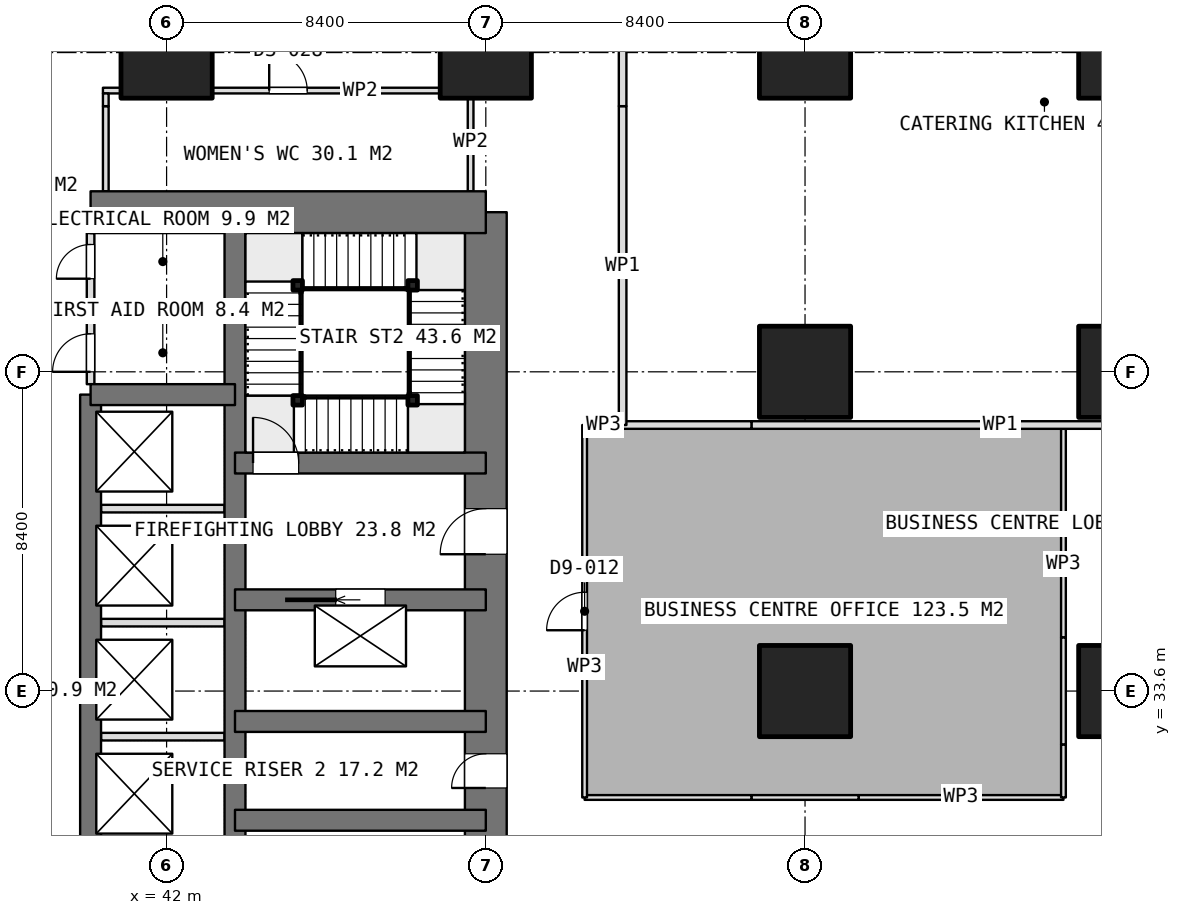
"""IFC4 building model, lengths in metres.
Left out: names, types, materials, properties, quantities, classifications, styles, units other than length and angle.
Written with IfcOpenShell. Run it as: python <this file> out.ifc"""

import sys

from ifc_helpers import new_model, si_unit, direction, frame, frame_2d, origin, origin_2d, place, context, subcontext, project, spatial, rectangle, extrude, element, fill, save


model = new_model("IFC4")
c1 = context("Model", 3, precision=1e-05, world=origin(), true_north=direction((0.0, 1.0)))
c2 = subcontext(c1, "Body", "Model", "MODEL_VIEW")
j1 = project(units=[si_unit("LENGTHUNIT", "METRE"), si_unit("PLANEANGLEUNIT", "RADIAN")], contexts=[c1])
p1 = place(None, origin())
s1 = spatial("IfcSite", under=j1, at=p1, CompositionType="ELEMENT")
p2 = place(p1, origin())
s2 = spatial("IfcBuilding", under=s1, at=p2, CompositionType="ELEMENT")
p3 = place(p2, frame((0.0, 0.0, 20.4)))
s3 = spatial("IfcBuildingStorey", under=s2, at=p3, CompositionType="ELEMENT", Elevation=20.4)
p4 = place(p3, frame((40.0, 46.2, 0.0), z_axis=(0.0, 0.0, 1.0), x_axis=(1.0, 0.0, 0.0)))
e1 = element("IfcWall", 1, at=p4, inside=s3, PredefinedType="SHEAR", context=c2, shape_type="SweptSolid", body=[
    extrude(rectangle(XDim=10.4, YDim=1.1, at=frame_2d((5.2, 0.0))), origin(), (0.0, 0.0, 1.0), 5.0),
])
p5 = place(p3, frame((50.4, 21.0, 0.0), z_axis=(0.0, 0.0, 1.0), x_axis=(0.0, 1.0, 0.0)))
e2 = element("IfcWall", 2, at=p5, inside=s3, PredefinedType="SHEAR", context=c2, shape_type="SweptSolid", body=[
    extrude(rectangle(XDim=25.2, YDim=1.1, at=frame_2d((12.6, 0.0))), origin(), (0.0, 0.0, 1.0), 5.0),
])
p6 = place(p5, frame((16.2, 0.0, 0.0)))
e3 = element("IfcOpeningElement", 3, at=p6, cuts=e2, PredefinedType="OPENING", context=c2, shape_type="SweptSolid", body=[
    extrude(rectangle(XDim=1.2, YDim=2.1, at=frame_2d((0.6, 1.05))), frame((0.0, 0.56, 0.0), z_axis=(0.0, -1.0, 0.0), x_axis=(1.0, 0.0, 0.0)), (0.0, 0.0, 1.0), 1.12),
])
p7 = place(p5, frame((10.05, 0.0, 0.0)))
e4 = element("IfcOpeningElement", 4, at=p7, cuts=e2, PredefinedType="OPENING", context=c2, shape_type="SweptSolid", body=[
    extrude(rectangle(XDim=0.9, YDim=2.1, at=frame_2d((0.45, 1.05))), frame((0.0, 0.56, 0.0), z_axis=(0.0, -1.0, 0.0), x_axis=(1.0, 0.0, 0.0)), (0.0, 0.0, 1.0), 1.12),
])
p8 = place(p5, frame((7.45, 0.0, 0.0)))
e5 = element("IfcOpeningElement", 5, at=p8, cuts=e2, PredefinedType="OPENING", context=c2, shape_type="SweptSolid", body=[
    extrude(rectangle(XDim=0.9, YDim=2.1, at=frame_2d((0.45, 1.05))), frame((0.0, 0.56, 0.0), z_axis=(0.0, -1.0, 0.0), x_axis=(1.0, 0.0, 0.0)), (0.0, 0.0, 1.0), 1.12),
])
p9 = place(p5, frame((0.75, 0.0, 0.0)))
e6 = element("IfcOpeningElement", 6, at=p9, cuts=e2, PredefinedType="OPENING", context=c2, shape_type="SweptSolid", body=[
    extrude(rectangle(XDim=1.2, YDim=2.1, at=frame_2d((0.6, 1.05))), frame((0.0, 0.56, 0.0), z_axis=(0.0, -1.0, 0.0), x_axis=(1.0, 0.0, 0.0)), (0.0, 0.0, 1.0), 1.12),
])
p10 = place(p3, frame((43.8, 21.0, 0.0), z_axis=(0.0, 0.0, 1.0), x_axis=(0.0, 1.0, 0.0)))
e7 = element("IfcWall", 7, at=p10, inside=s3, PredefinedType="SHEAR", context=c2, shape_type="SweptSolid", body=[
    extrude(rectangle(XDim=25.2, YDim=0.55, at=frame_2d((12.6, 0.0))), origin(), (0.0, 0.0, 1.0), 5.0),
])
p11 = place(p3, frame((40.0, 23.4, 0.0), z_axis=(0.0, 0.0, 1.0), x_axis=(0.0, 1.0, 0.0)))
e8 = element("IfcWall", 8, at=p11, inside=s3, PredefinedType="SHEAR", context=c2, shape_type="SweptSolid", body=[
    extrude(rectangle(XDim=18.0, YDim=0.55, at=frame_2d((9.0, 0.0))), origin(), (0.0, 0.0, 1.0), 5.0),
])
p12 = place(p3, frame((40.0, 41.4, 0.0), z_axis=(0.0, 0.0, 1.0), x_axis=(1.0, 0.0, 0.0)))
e9 = element("IfcWall", 9, at=p12, inside=s3, PredefinedType="SHEAR", context=c2, shape_type="SweptSolid", body=[
    extrude(rectangle(XDim=3.8, YDim=0.55, at=frame_2d((1.9, 0.0))), origin(), (0.0, 0.0, 1.0), 5.0),
])
for number, where, z_axis, x_axis in (
    (10, (43.8, 30.2, 0.0), (0.0, 0.0, 1.0), (1.0, 0.0, 0.0)),
    (11, (43.8, 32.8, 0.0), (0.0, 0.0, 1.0), (1.0, 0.0, 0.0)),
):
    element("IfcWall", number, at=place(p3, frame(where, z_axis=z_axis, x_axis=x_axis)), inside=s3, PredefinedType="SHEAR", context=c2, shape_type="SweptSolid", body=[
        extrude(rectangle(XDim=6.6, YDim=0.55, at=frame_2d((3.3, 0.0))), origin(), (0.0, 0.0, 1.0), 5.0),
    ])
p13 = place(p3, frame((43.8, 36.0, 0.0), z_axis=(0.0, 0.0, 1.0), x_axis=(1.0, 0.0, 0.0)))
e12 = element("IfcWall", 12, at=p13, inside=s3, PredefinedType="SHEAR", context=c2, shape_type="SweptSolid", body=[
    extrude(rectangle(XDim=6.6, YDim=0.55, at=frame_2d((3.3, 0.0))), origin(), (0.0, 0.0, 1.0), 5.0),
])
p14 = place(p13, frame((2.65, 0.0, 0.0)))
e13 = element("IfcOpeningElement", 13, at=p14, cuts=e12, PredefinedType="OPENING", context=c2, shape_type="SweptSolid", body=[
    extrude(rectangle(XDim=1.3, YDim=2.1, at=frame_2d((0.65, 1.05))), frame((0.0, 0.285, 0.0), z_axis=(0.0, -1.0, 0.0), x_axis=(1.0, 0.0, 0.0)), (0.0, 0.0, 1.0), 0.57),
])
p15 = place(p3, frame((43.8, 39.6, 0.0), z_axis=(0.0, 0.0, 1.0), x_axis=(1.0, 0.0, 0.0)))
e14 = element("IfcWall", 14, at=p15, inside=s3, PredefinedType="SHEAR", context=c2, shape_type="SweptSolid", body=[
    extrude(rectangle(XDim=6.6, YDim=0.55, at=frame_2d((3.3, 0.0))), origin(), (0.0, 0.0, 1.0), 5.0),
])
p16 = place(p15, frame((0.475, 0.0, 0.0)))
e15 = element("IfcOpeningElement", 15, at=p16, cuts=e14, PredefinedType="OPENING", context=c2, shape_type="SweptSolid", body=[
    extrude(rectangle(XDim=1.2, YDim=2.1, at=frame_2d((0.6, 1.05))), frame((0.0, 0.285, 0.0), z_axis=(0.0, -1.0, 0.0), x_axis=(1.0, 0.0, 0.0)), (0.0, 0.0, 1.0), 0.57),
])
for number, where, z_axis, x_axis in (
    (16, (42.0, 50.4, 0.0), (0.0, 0.0, 1.0), (1.0, 0.0, 0.0)),
    (17, (50.4, 50.4, 0.0), (0.0, 0.0, 1.0), (1.0, 0.0, 0.0)),
    (18, (58.8, 33.6, 0.0), (0.0, 0.0, 1.0), (1.0, 0.0, 0.0)),
    (19, (58.8, 42.0, 0.0), (0.0, 0.0, 1.0), (1.0, 0.0, 0.0)),
    (20, (58.8, 50.4, 0.0), (0.0, 0.0, 1.0), (1.0, 0.0, 0.0)),
    (21, (67.2, 33.6, 0.0), (0.0, 0.0, 1.0), (1.0, 0.0, 0.0)),
    (22, (67.2, 42.0, 0.0), (0.0, 0.0, 1.0), (1.0, 0.0, 0.0)),
    (23, (67.2, 50.4, 0.0), (0.0, 0.0, 1.0), (1.0, 0.0, 0.0)),
):
    element("IfcColumn", number, at=place(p3, frame(where, z_axis=z_axis, x_axis=x_axis)), inside=s3, PredefinedType="COLUMN", context=c2, shape_type="SweptSolid", body=[
        extrude(rectangle(XDim=2.4, YDim=2.4, at=origin_2d()), origin(), (0.0, 0.0, 1.0), 5.0),
    ])
for number, where, z_axis, x_axis in (
    (24, (40.275, 32.4, 0.0), (0.0, 0.0, 1.0), (1.0, 0.0, 0.0)),
    (25, (40.275, 35.4, 0.0), (0.0, 0.0, 1.0), (1.0, 0.0, 0.0)),
    (26, (40.275, 38.4, 0.0), (0.0, 0.0, 1.0), (1.0, 0.0, 0.0)),
):
    element("IfcWall", number, at=place(p3, frame(where, z_axis=z_axis, x_axis=x_axis)), inside=s3, PredefinedType="PARTITIONING", context=c2, shape_type="SweptSolid", body=[
        extrude(rectangle(XDim=3.25, YDim=0.2, at=frame_2d((1.625, 0.0))), origin(), (0.0, 0.0, 1.0), 4.6),
    ])
p17 = place(p3, frame((40.0, 41.675, 0.0), z_axis=(0.0, 0.0, 1.0), x_axis=(0.0, 1.0, 0.0)))
e27 = element("IfcWall", 27, at=p17, inside=s3, PredefinedType="PARTITIONING", context=c2, shape_type="SweptSolid", body=[
    extrude(rectangle(XDim=3.975, YDim=0.2, at=frame_2d((1.987, 0.0))), origin(), (0.0, 0.0, 1.0), 4.6),
])
p18 = place(p17, frame((2.775, 0.0, 0.0)))
e28 = element("IfcOpeningElement", 28, at=p18, cuts=e27, PredefinedType="OPENING", context=c2, shape_type="SweptSolid", body=[
    extrude(rectangle(XDim=0.9, YDim=2.1, at=frame_2d((0.45, 1.05))), frame((0.0, 0.11, 0.0), z_axis=(0.0, -1.0, 0.0), x_axis=(1.0, 0.0, 0.0)), (0.0, 0.0, 1.0), 0.22),
])
p19 = place(p17, frame((0.325, 0.0, 0.0)))
e29 = element("IfcOpeningElement", 29, at=p19, cuts=e27, PredefinedType="OPENING", context=c2, shape_type="SweptSolid", body=[
    extrude(rectangle(XDim=1.0, YDim=2.1, at=frame_2d((0.5, 1.05))), frame((0.0, 0.11, 0.0), z_axis=(0.0, -1.0, 0.0), x_axis=(1.0, 0.0, 0.0)), (0.0, 0.0, 1.0), 0.22),
])
p20 = place(p3, frame((40.0, 43.6, 0.0), z_axis=(0.0, 0.0, 1.0), x_axis=(1.0, 0.0, 0.0)))
e30 = element("IfcWall", 30, at=p20, inside=s3, PredefinedType="PARTITIONING", context=c2, shape_type="SweptSolid", body=[
    extrude(rectangle(XDim=3.525, YDim=0.2, at=frame_2d((1.762, 0.0))), origin(), (0.0, 0.0, 1.0), 4.6),
])
p21 = place(p3, frame((40.325, 49.4, 0.0), z_axis=(0.0, 0.0, 1.0), x_axis=(1.0, 0.0, 0.0)))
e31 = element("IfcWall", 31, at=p21, inside=s3, PredefinedType="PARTITIONING", context=c2, shape_type="SweptSolid", body=[
    extrude(rectangle(XDim=0.475, YDim=0.15, at=frame_2d((0.238, 0.0))), origin(), (0.0, 0.0, 1.0), 2.8),
])
p22 = place(p3, frame((40.8, 49.4, 0.0), z_axis=(0.0, 0.0, 1.0), x_axis=(1.0, 0.0, 0.0)))
e32 = element("IfcWall", 32, at=p22, inside=s3, PredefinedType="PARTITIONING", context=c2, shape_type="SweptSolid", body=[
    extrude(rectangle(XDim=2.4, YDim=0.15, at=frame_2d((1.2, 0.0))), origin(), (0.0, 0.0, 1.0), 4.6),
])
p23 = place(p3, frame((43.2, 49.4, 0.0), z_axis=(0.0, 0.0, 1.0), x_axis=(1.0, 0.0, 0.0)))
e33 = element("IfcWall", 33, at=p23, inside=s3, PredefinedType="PARTITIONING", context=c2, shape_type="SweptSolid", body=[
    extrude(rectangle(XDim=6.0, YDim=0.15, at=frame_2d((3.0, 0.0))), origin(), (0.0, 0.0, 1.0), 2.8),
])
p24 = place(p23, frame((1.5, 0.0, 0.0)))
e34 = element("IfcOpeningElement", 34, at=p24, cuts=e33, PredefinedType="OPENING", context=c2, shape_type="SweptSolid", body=[
    extrude(rectangle(XDim=1.0, YDim=2.1, at=frame_2d((0.5, 1.05))), frame((0.0, 0.085, 0.0), z_axis=(0.0, -1.0, 0.0), x_axis=(1.0, 0.0, 0.0)), (0.0, 0.0, 1.0), 0.17),
])
p25 = place(p3, frame((49.2, 49.4, 0.0), z_axis=(0.0, 0.0, 1.0), x_axis=(1.0, 0.0, 0.0)))
e35 = element("IfcWall", 35, at=p25, inside=s3, PredefinedType="PARTITIONING", context=c2, shape_type="SweptSolid", body=[
    extrude(rectangle(XDim=0.875, YDim=0.15, at=frame_2d((0.438, 0.0))), origin(), (0.0, 0.0, 1.0), 4.6),
])
p26 = place(p3, frame((40.4, 46.75, 0.0), z_axis=(0.0, 0.0, 1.0), x_axis=(0.0, 1.0, 0.0)))
e36 = element("IfcWall", 36, at=p26, inside=s3, PredefinedType="PARTITIONING", context=c2, shape_type="SweptSolid", body=[
    extrude(rectangle(XDim=2.24, YDim=0.15, at=frame_2d((1.12, 0.0))), origin(), (0.0, 0.0, 1.0), 4.6),
])
p27 = place(p3, frame((40.4, 48.99, 0.0), z_axis=(0.0, 0.0, 1.0), x_axis=(0.0, 1.0, 0.0)))
e37 = element("IfcWall", 37, at=p27, inside=s3, PredefinedType="PARTITIONING", context=c2, shape_type="SweptSolid", body=[
    extrude(rectangle(XDim=0.335, YDim=0.15, at=frame_2d((0.167, 0.0))), origin(), (0.0, 0.0, 1.0), 2.8),
])
p28 = place(p3, frame((50.0, 46.75, 0.0), z_axis=(0.0, 0.0, 1.0), x_axis=(0.0, 1.0, 0.0)))
e38 = element("IfcWall", 38, at=p28, inside=s3, PredefinedType="PARTITIONING", context=c2, shape_type="SweptSolid", body=[
    extrude(rectangle(XDim=2.575, YDim=0.15, at=frame_2d((1.288, 0.0))), origin(), (0.0, 0.0, 1.0), 4.6),
])
p29 = place(p3, frame((76.09, 40.6, 0.0), z_axis=(0.0, 0.0, 1.0), x_axis=(-1.0, 0.0, 0.0)))
e39 = element("IfcWall", 39, at=p29, inside=s3, PredefinedType="PARTITIONING", context=c2, shape_type="SweptSolid", body=[
    extrude(rectangle(XDim=18.7, YDim=0.2, at=frame_2d((9.35, 0.0))), origin(), (0.0, 0.0, 1.0), 2.8),
])
p30 = place(p29, frame((5.77, 0.0, 0.0)))
e40 = element("IfcOpeningElement", 40, at=p30, cuts=e39, PredefinedType="OPENING", context=c2, shape_type="SweptSolid", body=[
    extrude(rectangle(XDim=1.8, YDim=2.1, at=frame_2d((0.9, 1.05))), frame((0.0, 0.11, 0.0), z_axis=(0.0, -1.0, 0.0), x_axis=(1.0, 0.0, 0.0)), (0.0, 0.0, 1.0), 0.22),
])
p31 = place(p3, frame((57.39, 40.6, 0.0), z_axis=(0.0, 0.0, 1.0), x_axis=(-1.0, 0.0, 0.0)))
e41 = element("IfcWall", 41, at=p31, inside=s3, PredefinedType="PARTITIONING", context=c2, shape_type="SweptSolid", body=[
    extrude(rectangle(XDim=3.39, YDim=0.2, at=frame_2d((1.695, 0.0))), origin(), (0.0, 0.0, 1.0), 4.6),
])
p32 = place(p3, frame((54.0, 40.6, 0.0), z_axis=(0.0, 0.0, 1.0), x_axis=(0.0, 1.0, 0.0)))
e42 = element("IfcWall", 42, at=p32, inside=s3, PredefinedType="PARTITIONING", context=c2, shape_type="SweptSolid", body=[
    extrude(rectangle(XDim=8.39, YDim=0.2, at=frame_2d((4.195, 0.0))), origin(), (0.0, 0.0, 1.0), 4.6),
])
p33 = place(p3, frame((54.0, 48.99, 0.0), z_axis=(0.0, 0.0, 1.0), x_axis=(0.0, 1.0, 0.0)))
e43 = element("IfcWall", 43, at=p33, inside=s3, PredefinedType="PARTITIONING", context=c2, shape_type="SweptSolid", body=[
    extrude(rectangle(XDim=2.82, YDim=0.2, at=frame_2d((1.41, 0.0))), origin(), (0.0, 0.0, 1.0), 2.8),
])
p34 = place(p3, frame((65.6, 30.8, 0.0), z_axis=(0.0, 0.0, 1.0), x_axis=(-1.0, 0.0, 0.0)))
e44 = element("IfcWall", 44, at=p34, inside=s3, PredefinedType="PARTITIONING", context=c2, shape_type="SweptSolid", body=[
    extrude(rectangle(XDim=5.39, YDim=0.125, at=frame_2d((2.695, 0.0))), origin(), (0.0, 0.0, 1.0), 4.6),
])
p35 = place(p3, frame((60.21, 30.8, 0.0), z_axis=(0.0, 0.0, 1.0), x_axis=(-1.0, 0.0, 0.0)))
e45 = element("IfcWall", 45, at=p35, inside=s3, PredefinedType="PARTITIONING", context=c2, shape_type="SweptSolid", body=[
    extrude(rectangle(XDim=2.82, YDim=0.125, at=frame_2d((1.41, 0.0))), origin(), (0.0, 0.0, 1.0), 2.8),
])
p36 = place(p3, frame((57.39, 30.8, 0.0), z_axis=(0.0, 0.0, 1.0), x_axis=(-1.0, 0.0, 0.0)))
e46 = element("IfcWall", 46, at=p36, inside=s3, PredefinedType="PARTITIONING", context=c2, shape_type="SweptSolid", body=[
    extrude(rectangle(XDim=4.39, YDim=0.125, at=frame_2d((2.195, 0.0))), origin(), (0.0, 0.0, 1.0), 4.6),
])
p37 = place(p3, frame((53.0, 30.8, 0.0), z_axis=(0.0, 0.0, 1.0), x_axis=(0.0, 1.0, 0.0)))
e47 = element("IfcWall", 47, at=p37, inside=s3, PredefinedType="PARTITIONING", context=c2, shape_type="SweptSolid", body=[
    extrude(rectangle(XDim=9.8, YDim=0.125, at=frame_2d((4.9, 0.0))), origin(), (0.0, 0.0, 1.0), 4.6),
])
p38 = place(p37, frame((4.4, 0.0, 0.0)))
e48 = element("IfcOpeningElement", 48, at=p38, cuts=e47, PredefinedType="OPENING", context=c2, shape_type="SweptSolid", body=[
    extrude(rectangle(XDim=1.0, YDim=2.1, at=frame_2d((0.5, 1.05))), frame((0.0, 0.073, 0.0), z_axis=(0.0, -1.0, 0.0), x_axis=(1.0, 0.0, 0.0)), (0.0, 0.0, 1.0), 0.145),
])
p39 = place(p3, frame((53.0, 40.6, 0.0), z_axis=(0.0, 0.0, 1.0), x_axis=(1.0, 0.0, 0.0)))
e49 = element("IfcWall", 49, at=p39, inside=s3, PredefinedType="PARTITIONING", context=c2, shape_type="SweptSolid", body=[
    extrude(rectangle(XDim=1.0, YDim=0.125, at=frame_2d((0.5, 0.0))), origin(), (0.0, 0.0, 1.0), 4.6),
])
p40 = place(p3, frame((65.6, 40.5, 0.0), z_axis=(0.0, 0.0, 1.0), x_axis=(0.0, -1.0, 0.0)))
e50 = element("IfcWall", 50, at=p40, inside=s3, PredefinedType="PARTITIONING", context=c2, shape_type="SweptSolid", body=[
    extrude(rectangle(XDim=5.49, YDim=0.125, at=frame_2d((2.745, 0.0))), origin(), (0.0, 0.0, 1.0), 2.8),
])
p41 = place(p3, frame((65.6, 35.01, 0.0), z_axis=(0.0, 0.0, 1.0), x_axis=(0.0, -1.0, 0.0)))
e51 = element("IfcWall", 51, at=p41, inside=s3, PredefinedType="PARTITIONING", context=c2, shape_type="SweptSolid", body=[
    extrude(rectangle(XDim=2.82, YDim=0.125, at=frame_2d((1.41, 0.0))), origin(), (0.0, 0.0, 1.0), 2.8),
])
p42 = place(p3, frame((65.6, 32.19, 0.0), z_axis=(0.0, 0.0, 1.0), x_axis=(0.0, -1.0, 0.0)))
e52 = element("IfcWall", 52, at=p42, inside=s3, PredefinedType="PARTITIONING", context=c2, shape_type="SweptSolid", body=[
    extrude(rectangle(XDim=1.39, YDim=0.125, at=frame_2d((0.695, 0.0))), origin(), (0.0, 0.0, 1.0), 4.6),
])
for number, where, z_axis, x_axis in (
    (53, (45.45, 41.25, 0.0), (0.0, 0.0, 1.0), (1.0, 0.0, 0.0)),
    (54, (45.45, 44.275, 0.0), (0.0, 0.0, 1.0), (1.0, 0.0, 0.0)),
    (55, (48.475, 44.275, 0.0), (0.0, 0.0, 1.0), (1.0, 0.0, 0.0)),
    (56, (48.475, 41.25, 0.0), (0.0, 0.0, 1.0), (1.0, 0.0, 0.0)),
):
    element("IfcColumn", number, at=place(p3, frame(where, z_axis=z_axis, x_axis=x_axis)), inside=s3, PredefinedType="COLUMN", context=c2, shape_type="SweptSolid", body=[
        extrude(rectangle(XDim=0.25, YDim=0.25, at=origin_2d()), origin(), (0.0, 0.0, 1.0), 5.0),
    ])
p43 = place(p6, origin())
e57 = element("IfcDoor", 57, at=p43, inside=s3, OperationType="SINGLE_SWING_LEFT", PredefinedType="DOOR", context=c2, shape_type="SweptSolid", body=[
    extrude(rectangle(XDim=1.2, YDim=2.1, at=frame_2d((0.6, 1.05))), frame((0.0, 0.025, 0.0), z_axis=(0.0, -1.0, 0.0), x_axis=(1.0, 0.0, 0.0)), (0.0, 0.0, 1.0), 0.05),
])
fill(e3, e57)
p44 = place(p7, origin())
e58 = element("IfcDoor", 58, at=p44, inside=s3, OperationType="SINGLE_SWING_LEFT", PredefinedType="DOOR", context=c2, shape_type="SweptSolid", body=[
    extrude(rectangle(XDim=0.9, YDim=2.1, at=frame_2d((0.45, 1.05))), frame((0.0, 0.025, 0.0), z_axis=(0.0, -1.0, 0.0), x_axis=(1.0, 0.0, 0.0)), (0.0, 0.0, 1.0), 0.05),
])
fill(e4, e58)
p45 = place(p18, origin())
e59 = element("IfcDoor", 59, at=p45, inside=s3, OperationType="SINGLE_SWING_LEFT", PredefinedType="DOOR", context=c2, shape_type="SweptSolid", body=[
    extrude(rectangle(XDim=0.9, YDim=2.1, at=frame_2d((0.45, 1.05))), frame((0.0, 0.025, 0.0), z_axis=(0.0, -1.0, 0.0), x_axis=(1.0, 0.0, 0.0)), (0.0, 0.0, 1.0), 0.05),
])
fill(e28, e59)
p46 = place(p19, origin())
e60 = element("IfcDoor", 60, at=p46, inside=s3, OperationType="SINGLE_SWING_LEFT", PredefinedType="DOOR", context=c2, shape_type="SweptSolid", body=[
    extrude(rectangle(XDim=1.0, YDim=2.1, at=frame_2d((0.5, 1.05))), frame((0.0, 0.025, 0.0), z_axis=(0.0, -1.0, 0.0), x_axis=(1.0, 0.0, 0.0)), (0.0, 0.0, 1.0), 0.05),
])
fill(e29, e60)
p47 = place(p14, origin())
e61 = element("IfcDoor", 61, at=p47, inside=s3, OperationType="SLIDING_TO_LEFT", PredefinedType="USERDEFINED", context=c2, shape_type="SweptSolid", body=[
    extrude(rectangle(XDim=1.3, YDim=2.1, at=frame_2d((0.65, 1.05))), frame((0.0, 0.025, 0.0), z_axis=(0.0, -1.0, 0.0), x_axis=(1.0, 0.0, 0.0)), (0.0, 0.0, 1.0), 0.05),
])
fill(e13, e61)
p48 = place(p24, origin())
e62 = element("IfcDoor", 62, at=p48, inside=s3, OperationType="SINGLE_SWING_LEFT", PredefinedType="DOOR", context=c2, shape_type="SweptSolid", body=[
    extrude(rectangle(XDim=1.0, YDim=2.1, at=frame_2d((0.5, 1.05))), frame((0.0, 0.025, 0.0), z_axis=(0.0, -1.0, 0.0), x_axis=(1.0, 0.0, 0.0)), (0.0, 0.0, 1.0), 0.05),
])
fill(e34, e62)
p49 = place(p38, origin())
e63 = element("IfcDoor", 63, at=p49, inside=s3, OperationType="SINGLE_SWING_LEFT", PredefinedType="DOOR", context=c2, shape_type="SweptSolid", body=[
    extrude(rectangle(XDim=1.0, YDim=2.1, at=frame_2d((0.5, 1.05))), frame((0.0, 0.025, 0.0), z_axis=(0.0, -1.0, 0.0), x_axis=(1.0, 0.0, 0.0)), (0.0, 0.0, 1.0), 0.05),
])
fill(e48, e63)
p50 = place(p16, origin())
e64 = element("IfcDoor", 64, at=p50, inside=s3, OperationType="SINGLE_SWING_RIGHT", PredefinedType="DOOR", context=c2, shape_type="SweptSolid", body=[
    extrude(rectangle(XDim=1.2, YDim=2.1, at=frame_2d((0.6, 1.05))), frame((0.0, 0.025, 0.0), z_axis=(0.0, -1.0, 0.0), x_axis=(1.0, 0.0, 0.0)), (0.0, 0.0, 1.0), 0.05),
])
fill(e15, e64)
save(model, sys.argv[1])
